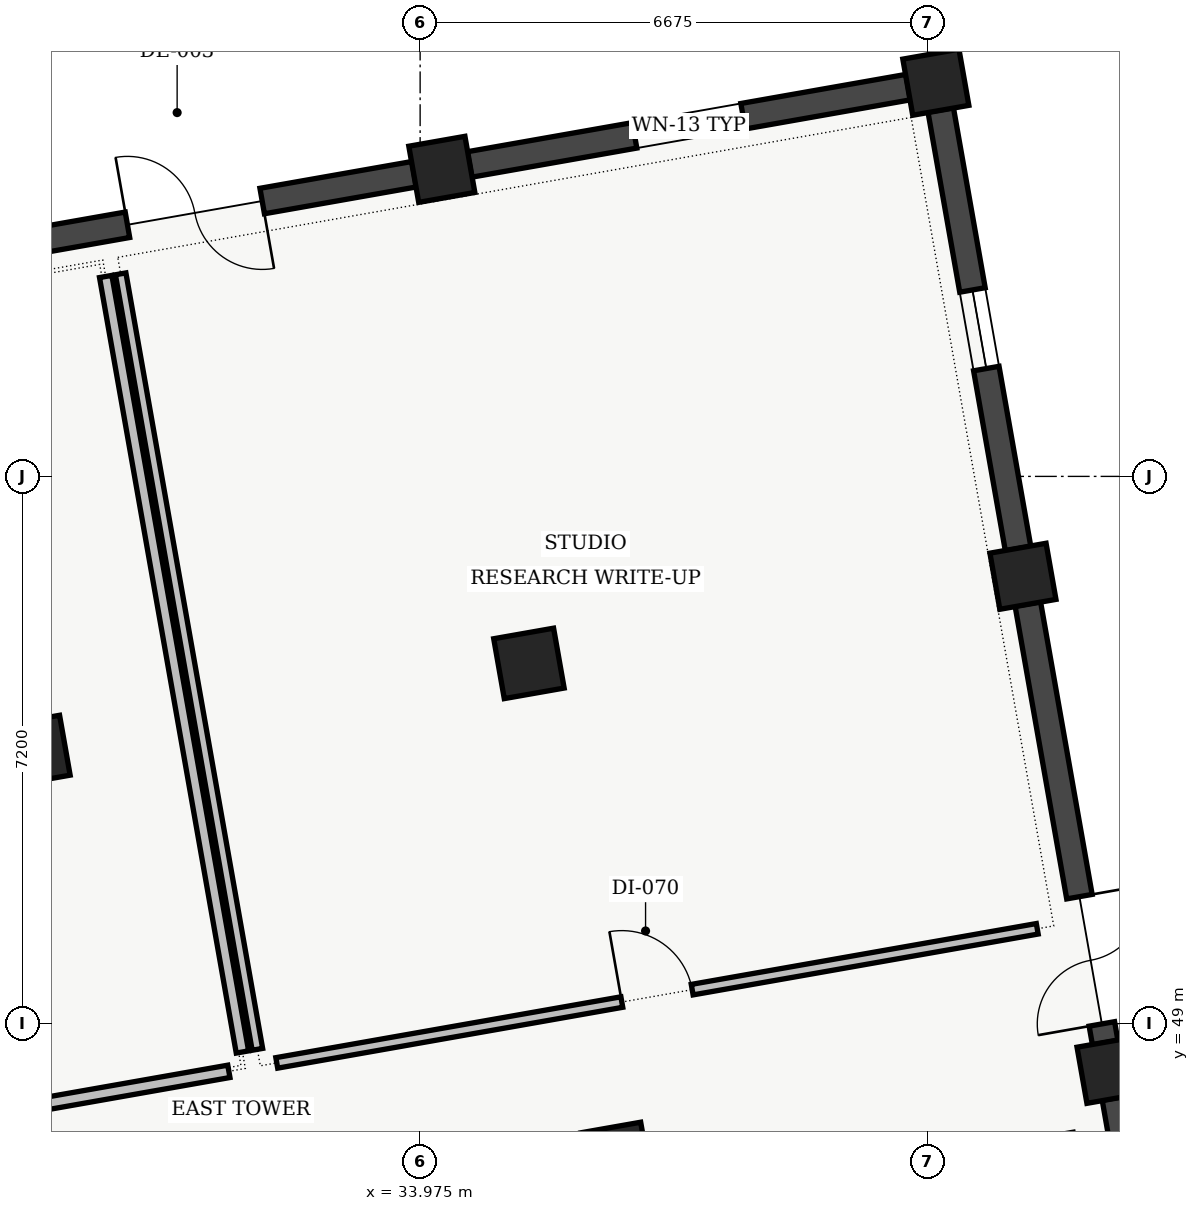
"""IFC4 building model, lengths in metres.
Left out: names, types, materials, properties, quantities, classifications, styles, units other than length and angle.
Written with IfcOpenShell. Run it as: python <this file> out.ifc"""

import sys

from ifc_helpers import new_model, si_unit, direction, frame, frame_2d, origin, origin_2d, place, context, subcontext, project, spatial, rectangle, extrude, element, fill, save


model = new_model("IFC4")
c1 = context("Model", 3, precision=1e-05, world=origin(), true_north=direction((0.0, 1.0)))
c2 = subcontext(c1, "Body", "Model", "MODEL_VIEW")
j1 = project(units=[si_unit("LENGTHUNIT", "METRE"), si_unit("PLANEANGLEUNIT", "RADIAN")], contexts=[c1])
p1 = place(None, origin())
s1 = spatial("IfcSite", under=j1, at=p1, CompositionType="ELEMENT")
p2 = place(p1, origin())
s2 = spatial("IfcBuilding", under=s1, at=p2, CompositionType="ELEMENT")
p3 = place(p2, origin())
s3 = spatial("IfcBuildingStorey", under=s2, at=p3, CompositionType="ELEMENT", Elevation=0.0)
for number, where, z_axis, x_axis in (
    (1, (28.907, 52.594, 0.0), (0.0, 0.0, 1.0), (0.985, 0.174, 0.0)),
    (2, (36.552, 47.24, 0.0), (0.0, 0.0, 1.0), (0.985, 0.174, 0.0)),
    (3, (35.406, 53.74, 0.0), (0.0, 0.0, 1.0), (0.985, 0.174, 0.0)),
):
    element("IfcColumn", number, at=place(p3, frame(where, z_axis=z_axis, x_axis=x_axis)), inside=s3, PredefinedType="COLUMN", context=c2, shape_type="SweptSolid", body=[
        extrude(rectangle(XDim=0.8, YDim=0.8, at=origin_2d()), origin(), (0.0, 0.0, 1.0), 4.92),
    ])
for number, where, z_axis, x_axis in (
    (4, (34.26, 60.24, 0.0), (0.0, 0.0, 1.0), (0.985, 0.174, 0.0)),
    (5, (43.052, 48.386, 0.0), (0.0, 0.0, 1.0), (0.985, 0.174, 0.0)),
    (6, (41.906, 54.886, 0.0), (0.0, 0.0, 1.0), (0.985, 0.174, 0.0)),
    (7, (40.76, 61.386, 0.0), (0.0, 0.0, 1.0), (0.985, 0.174, 0.0)),
):
    element("IfcColumn", number, at=place(p3, frame(where, z_axis=z_axis, x_axis=x_axis)), inside=s3, PredefinedType="COLUMN", context=c2, shape_type="SweptSolid", body=[
        extrude(rectangle(XDim=0.75, YDim=0.75, at=origin_2d()), origin(), (0.0, 0.0, 1.0), 4.92),
    ])
p4 = place(p3, frame((28.125, 59.158, 0.0), z_axis=(0.0, 0.0, 1.0), x_axis=(0.984807875342, 0.1736474839, 0.0)))
e8 = element("IfcWall", 8, at=p4, inside=s3, PredefinedType="SOLIDWALL", context=c2, shape_type="SweptSolid", body=[
    extrude(rectangle(XDim=5.86, YDim=0.34, at=frame_2d((2.93, 0.0))), origin(), (0.0, 0.0, 1.0), 4.455),
])
p5 = place(p4, frame((2.03, 0.0, 0.0)))
e9 = element("IfcOpeningElement", 9, at=p5, cuts=e8, PredefinedType="OPENING", context=c2, shape_type="SweptSolid", body=[
    extrude(rectangle(XDim=1.8, YDim=2.25, at=frame_2d((0.9, 1.125))), frame((0.0, 0.17, 0.0), z_axis=(0.0, -1.0, 0.0), x_axis=(1.0, 0.0, 0.0)), (0.0, 0.0, 1.0), 0.34),
])
p6 = place(p3, frame((34.625, 60.304, 0.0), z_axis=(0.0, 0.0, 1.0), x_axis=(0.984807875342, 0.1736474839, 0.0)))
e10 = element("IfcWall", 10, at=p6, inside=s3, PredefinedType="SOLIDWALL", context=c2, shape_type="SweptSolid", body=[
    extrude(rectangle(XDim=5.86, YDim=0.34, at=frame_2d((2.93, 0.0))), origin(), (0.0, 0.0, 1.0), 4.455),
])
p7 = place(p6, frame((2.205, 0.0, 0.95)))
e11 = element("IfcOpeningElement", 11, at=p7, cuts=e10, PredefinedType="OPENING", context=c2, shape_type="SweptSolid", body=[
    extrude(rectangle(XDim=1.45, YDim=1.35, at=frame_2d((0.725, 0.675))), frame((0.0, 0.17, 0.0), z_axis=(0.0, -1.0, 0.0), x_axis=(1.0, 0.0, 0.0)), (0.0, 0.0, 1.0), 0.34),
])
p8 = place(p3, frame((40.824, 61.021, 0.0), z_axis=(0.0, 0.0, 1.0), x_axis=(0.1736474839, -0.984807875342, 0.0)))
e12 = element("IfcWall", 12, at=p8, inside=s3, PredefinedType="SOLIDWALL", context=c2, shape_type="SweptSolid", body=[
    extrude(rectangle(XDim=5.86, YDim=0.34, at=frame_2d((2.93, 0.0))), origin(), (0.0, 0.0, 1.0), 4.455),
])
p9 = place(p8, frame((2.405, 0.0, 0.95)))
e13 = element("IfcOpeningElement", 13, at=p9, cuts=e12, PredefinedType="OPENING", context=c2, shape_type="SweptSolid", body=[
    extrude(rectangle(XDim=1.05, YDim=1.2, at=frame_2d((0.525, 0.6))), frame((0.0, 0.17, 0.0), z_axis=(0.0, -1.0, 0.0), x_axis=(1.0, 0.0, 0.0)), (0.0, 0.0, 1.0), 0.34),
])
p10 = place(p3, frame((41.97, 54.521, 0.0), z_axis=(0.0, 0.0, 1.0), x_axis=(0.1736474839, -0.984807875342, 0.0)))
e14 = element("IfcWall", 14, at=p10, inside=s3, PredefinedType="SOLIDWALL", context=c2, shape_type="SweptSolid", body=[
    extrude(rectangle(XDim=5.86, YDim=0.34, at=frame_2d((2.93, 0.0))), origin(), (0.0, 0.0, 1.0), 4.455),
])
p11 = place(p10, frame((3.91, 0.0, 0.0)))
e15 = element("IfcOpeningElement", 15, at=p11, cuts=e14, PredefinedType="OPENING", context=c2, shape_type="SweptSolid", body=[
    extrude(rectangle(XDim=1.7, YDim=2.2, at=frame_2d((0.85, 1.1))), frame((0.0, 0.17, 0.0), z_axis=(0.0, -1.0, 0.0), x_axis=(1.0, 0.0, 0.0)), (0.0, 0.0, 1.0), 0.34),
])
p12 = place(p3, frame((43.116, 48.022, 0.0), z_axis=(0.0, 0.0, 1.0), x_axis=(0.1736474839, -0.984807875342, 0.0)))
e16 = element("IfcWall", 16, at=p12, inside=s3, PredefinedType="SOLIDWALL", context=c2, shape_type="SweptSolid", body=[
    extrude(rectangle(XDim=5.86, YDim=0.34, at=frame_2d((2.93, 0.0))), origin(), (0.0, 0.0, 1.0), 4.455),
])
p13 = place(p12, frame((2.255, 0.0, 0.95)))
e17 = element("IfcOpeningElement", 17, at=p13, cuts=e16, PredefinedType="OPENING", context=c2, shape_type="SweptSolid", body=[
    extrude(rectangle(XDim=1.35, YDim=1.8, at=frame_2d((0.675, 0.9))), frame((0.0, 0.17, 0.0), z_axis=(0.0, -1.0, 0.0), x_axis=(1.0, 0.0, 0.0)), (0.0, 0.0, 1.0), 0.34),
])
p14 = place(p3, frame((20.665, 46.469, 0.0), z_axis=(0.0, 0.0, 1.0), x_axis=(0.98480552757, 0.173660798302, 0.0)))
e18 = element("IfcWall", 18, at=p14, inside=s3, PredefinedType="PARTITIONING", context=c2, shape_type="SweptSolid", body=[
    extrude(rectangle(XDim=10.96, YDim=0.165, at=frame_2d((5.48, 0.0))), origin(), (0.0, 0.0, 1.0), 4.505),
])
p15 = place(p14, frame((4.725, 0.0, 0.0)))
e19 = element("IfcOpeningElement", 19, at=p15, cuts=e18, PredefinedType="OPENING", context=c2, shape_type="SweptSolid", body=[
    extrude(rectangle(XDim=1.51, YDim=2.12, at=frame_2d((0.755, 1.06))), frame((0.0, 0.083, 0.0), z_axis=(0.0, -1.0, 0.0), x_axis=(1.0, 0.0, 0.0)), (0.0, 0.0, 1.0), 0.165),
])
p16 = place(p3, frame((31.637, 48.628, 0.0), z_axis=(0.0, 0.0, 1.0), x_axis=(-0.173654930775, 0.984806562233, 0.0)))
e20 = element("IfcWall", 20, at=p16, inside=s3, PredefinedType="PARTITIONING", context=c2, shape_type="SweptSolid", body=[
    extrude(rectangle(XDim=10.36, YDim=0.165, at=frame_2d((5.18, 0.0))), origin(), (0.0, 0.0, 1.0), 4.55),
])
p17 = place(p3, frame((32.089, 48.484, 0.0), z_axis=(0.0, 0.0, 1.0), x_axis=(0.984809432242, 0.173638654012, 0.0)))
e21 = element("IfcWall", 21, at=p17, inside=s3, PredefinedType="PARTITIONING", context=c2, shape_type="SweptSolid", body=[
    extrude(rectangle(XDim=10.16, YDim=0.14, at=frame_2d((5.08, 0.0))), origin(), (0.0, 0.0, 1.0), 4.55),
])
p18 = place(p17, frame((4.61, 0.0, 0.0)))
e22 = element("IfcOpeningElement", 22, at=p18, cuts=e21, PredefinedType="OPENING", context=c2, shape_type="SweptSolid", body=[
    extrude(rectangle(XDim=0.94, YDim=2.12, at=frame_2d((0.47, 1.06))), frame((0.0, 0.07, 0.0), z_axis=(0.0, -1.0, 0.0), x_axis=(1.0, 0.0, 0.0)), (0.0, 0.0, 1.0), 0.14),
])
p19 = place(p3, frame((30.035, 58.865, 0.0), z_axis=(0.0, 0.0, 1.0), x_axis=(0.173654930775, -0.984806562233, 0.0)))
e23 = element("IfcWall", 23, at=p19, inside=s3, PredefinedType="PARTITIONING", context=c2, shape_type="SweptSolid", body=[
    extrude(rectangle(XDim=10.36, YDim=0.14, at=frame_2d((5.18, 0.0))), origin(), (0.0, 0.0, 1.0), 4.55),
])
p20 = place(p5, origin())
e24 = element("IfcDoor", 24, at=p20, inside=s3, OperationType="DOUBLE_DOOR_SINGLE_SWING", PredefinedType="DOOR", context=c2, shape_type="SweptSolid", body=[
    extrude(rectangle(XDim=1.8, YDim=2.25, at=frame_2d((0.9, 1.125))), frame((0.0, 0.025, 0.0), z_axis=(0.0, -1.0, 0.0), x_axis=(1.0, 0.0, 0.0)), (0.0, 0.0, 1.0), 0.05),
])
fill(e9, e24)
p21 = place(p7, origin())
e25 = element("IfcWindow", 25, at=p21, inside=s3, PartitioningType="SINGLE_PANEL", PredefinedType="WINDOW", context=c2, shape_type="SweptSolid", body=[
    extrude(rectangle(XDim=1.45, YDim=1.35, at=frame_2d((0.725, 0.675))), frame((0.0, 0.03, 0.0), z_axis=(0.0, -1.0, 0.0), x_axis=(1.0, 0.0, 0.0)), (0.0, 0.0, 1.0), 0.06),
])
fill(e11, e25)
p22 = place(p9, origin())
e26 = element("IfcWindow", 26, at=p22, inside=s3, PartitioningType="SINGLE_PANEL", PredefinedType="WINDOW", context=c2, shape_type="SweptSolid", body=[
    extrude(rectangle(XDim=1.05, YDim=1.2, at=frame_2d((0.525, 0.6))), frame((0.0, 0.03, 0.0), z_axis=(0.0, -1.0, 0.0), x_axis=(1.0, 0.0, 0.0)), (0.0, 0.0, 1.0), 0.06),
])
fill(e13, e26)
p23 = place(p11, origin())
e27 = element("IfcDoor", 27, at=p23, inside=s3, OperationType="DOUBLE_DOOR_SINGLE_SWING", PredefinedType="DOOR", context=c2, shape_type="SweptSolid", body=[
    extrude(rectangle(XDim=1.7, YDim=2.2, at=frame_2d((0.85, 1.1))), frame((0.0, 0.025, 0.0), z_axis=(0.0, -1.0, 0.0), x_axis=(1.0, 0.0, 0.0)), (0.0, 0.0, 1.0), 0.05),
])
fill(e15, e27)
p24 = place(p18, origin())
e28 = element("IfcDoor", 28, at=p24, inside=s3, OperationType="SINGLE_SWING_LEFT", PredefinedType="DOOR", context=c2, shape_type="SweptSolid", body=[
    extrude(rectangle(XDim=0.94, YDim=2.12, at=frame_2d((0.47, 1.06))), frame((0.0, 0.025, 0.0), z_axis=(0.0, -1.0, 0.0), x_axis=(1.0, 0.0, 0.0)), (0.0, 0.0, 1.0), 0.05),
])
fill(e22, e28)
save(model, sys.argv[1])
